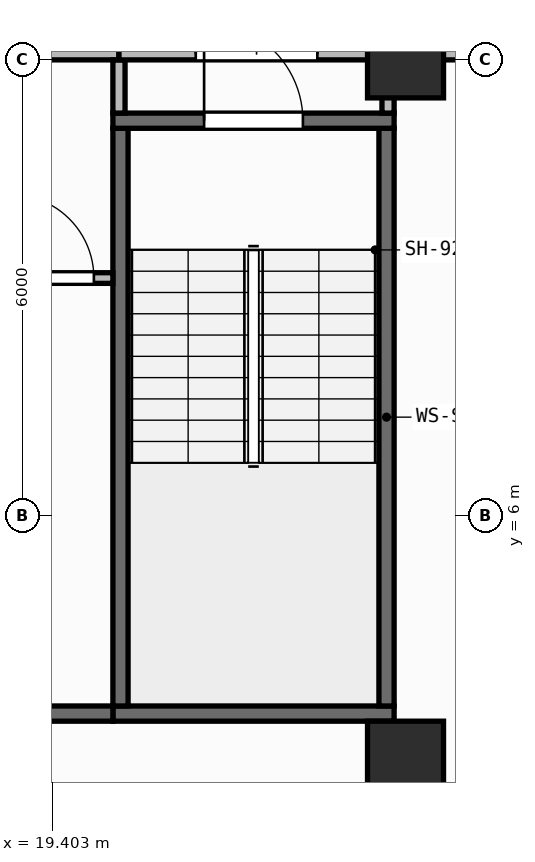
"""IFC4 building model, lengths in metres.
Left out: names, types, materials, properties, quantities, classifications, styles, units other than length and angle.
Written with IfcOpenShell. Run it as: python <this file> out.ifc"""

import sys

from ifc_helpers import new_model, si_unit, direction, frame, frame_2d, origin, origin_2d, place, context, subcontext, project, spatial, rectangle, extrude, element, fill, save


model = new_model("IFC4")
c1 = context("Model", 3, precision=1e-05, world=origin(), true_north=direction((0.0, 1.0)))
c2 = subcontext(c1, "Body", "Model", "MODEL_VIEW")
j1 = project(units=[si_unit("LENGTHUNIT", "METRE"), si_unit("PLANEANGLEUNIT", "RADIAN")], contexts=[c1])
p1 = place(None, origin())
s1 = spatial("IfcSite", under=j1, at=p1, CompositionType="ELEMENT")
p2 = place(p1, origin())
s2 = spatial("IfcBuilding", under=s1, at=p2, CompositionType="ELEMENT")
p3 = place(p2, frame((0.0, 0.0, 203.95)))
s3 = spatial("IfcBuildingStorey", under=s2, at=p3, CompositionType="ELEMENT", Elevation=203.95)
for number, where, z_axis, x_axis in (
    (1, (24.05, 2.8, 0.0), (0.0, 0.0, 1.0), (1.0, 0.0, 0.0)),
    (2, (24.05, 12.0, 0.0), (0.0, 0.0, 1.0), (1.0, 0.0, 0.0)),
):
    element("IfcColumn", number, at=place(p3, frame(where, z_axis=z_axis, x_axis=x_axis)), inside=s3, PredefinedType="COLUMN", context=c2, shape_type="SweptSolid", body=[
        extrude(rectangle(XDim=1.0, YDim=1.0, at=origin_2d()), origin(), (0.0, 0.0, 1.0), 3.95),
    ])
p4 = place(p3, frame((2.66, 0.174, 0.0), z_axis=(0.0, 0.0, 1.0), x_axis=(0.996634028439, 0.081979347142, 0.0)))
e3 = element("IfcWall", 3, at=p4, inside=s3, PredefinedType="STANDARD", context=c2, shape_type="SweptSolid", body=[
    extrude(rectangle(XDim=46.035, YDim=0.26, at=frame_2d((23.018, 0.0))), origin(), (0.0, 0.0, 1.0), 3.71),
])
p5 = place(p4, frame((21.817, 0.0, 0.9)))
e4 = element("IfcOpeningElement", 4, at=p5, cuts=e3, PredefinedType="OPENING", context=c2, shape_type="SweptSolid", body=[
    extrude(rectangle(XDim=2.4, YDim=1.65, at=frame_2d((1.2, 0.825))), frame((0.0, 0.14, 0.0), z_axis=(0.0, -1.0, 0.0), x_axis=(1.0, 0.0, 0.0)), (0.0, 0.0, 1.0), 0.28),
])
p6 = place(p3, frame((20.2, 3.4, 0.0), z_axis=(0.0, 0.0, 1.0), x_axis=(1.0, 0.0, 0.0)))
e5 = element("IfcWall", 5, at=p6, inside=s3, PredefinedType="SHEAR", context=c2, shape_type="SweptSolid", body=[
    extrude(rectangle(XDim=3.7, YDim=0.2, at=frame_2d((1.85, 0.0))), origin(), (0.0, 0.0, 1.0), 3.71),
])
for number, where, z_axis, x_axis in (
    (6, (20.3, 3.5, 0.0), (0.0, 0.0, 1.0), (0.0, 1.0, 0.0)),
    (7, (23.8, 3.5, 0.0), (0.0, 0.0, 1.0), (0.0, 1.0, 0.0)),
):
    element("IfcWall", number, at=place(p3, frame(where, z_axis=z_axis, x_axis=x_axis)), inside=s3, PredefinedType="SHEAR", context=c2, shape_type="SweptSolid", body=[
        extrude(rectangle(XDim=7.6, YDim=0.2, at=frame_2d((3.8, 0.0))), origin(), (0.0, 0.0, 1.0), 3.71),
    ])
p7 = place(p3, frame((20.2, 11.2, 0.0), z_axis=(0.0, 0.0, 1.0), x_axis=(1.0, 0.0, 0.0)))
e8 = element("IfcWall", 8, at=p7, inside=s3, PredefinedType="SHEAR", context=c2, shape_type="SweptSolid", body=[
    extrude(rectangle(XDim=3.7, YDim=0.2, at=frame_2d((1.85, 0.0))), origin(), (0.0, 0.0, 1.0), 3.71),
])
p8 = place(p7, frame((1.2, 0.0, 0.0)))
e9 = element("IfcOpeningElement", 9, at=p8, cuts=e8, PredefinedType="OPENING", context=c2, shape_type="SweptSolid", body=[
    extrude(rectangle(XDim=1.3, YDim=2.15, at=frame_2d((0.65, 1.075))), frame((0.0, 0.11, 0.0), z_axis=(0.0, -1.0, 0.0), x_axis=(1.0, 0.0, 0.0)), (0.0, 0.0, 1.0), 0.22),
])
p9 = place(p3, frame((6.5, 3.4, 0.0), z_axis=(0.0, 0.0, 1.0), x_axis=(1.0, 0.0, 0.0)))
e10 = element("IfcWall", 10, at=p9, inside=s3, PredefinedType="SHEAR", context=c2, shape_type="SweptSolid", body=[
    extrude(rectangle(XDim=13.7, YDim=0.2, at=frame_2d((6.85, 0.0))), origin(), (0.0, 0.0, 1.0), 3.71),
])
p10 = place(p3, frame((18.61, 9.13, 0.0), z_axis=(0.0, 0.0, 1.0), x_axis=(1.0, 0.0, 0.0)))
e11 = element("IfcWall", 11, at=p10, inside=s3, PredefinedType="PARTITIONING", context=c2, shape_type="SweptSolid", body=[
    extrude(rectangle(XDim=1.59, YDim=0.14, at=frame_2d((0.795, 0.0))), origin(), (0.0, 0.0, 1.0), 3.71),
])
p11 = place(p10, frame((0.24, 0.0, 0.0)))
e12 = element("IfcOpeningElement", 12, at=p11, cuts=e11, PredefinedType="OPENING", context=c2, shape_type="SweptSolid", body=[
    extrude(rectangle(XDim=1.1, YDim=2.1, at=frame_2d((0.55, 1.05))), frame((0.0, 0.08, 0.0), z_axis=(0.0, -1.0, 0.0), x_axis=(1.0, 0.0, 0.0)), (0.0, 0.0, 1.0), 0.16),
])
p12 = place(p3, frame((12.58, 12.08, 0.0), z_axis=(0.0, 0.0, 1.0), x_axis=(1.0, 0.0, 0.0)))
e13 = element("IfcWall", 13, at=p12, inside=s3, PredefinedType="PARTITIONING", context=c2, shape_type="SweptSolid", body=[
    extrude(rectangle(XDim=7.7, YDim=0.16, at=frame_2d((3.85, 0.0))), origin(), (0.0, 0.0, 1.0), 3.152),
])
p13 = place(p12, frame((3.05, 0.0, 0.0)))
e14 = element("IfcOpeningElement", 14, at=p13, cuts=e13, PredefinedType="OPENING", context=c2, shape_type="SweptSolid", body=[
    extrude(rectangle(XDim=1.6, YDim=2.05, at=frame_2d((0.8, 1.025))), frame((0.0, 0.09, 0.0), z_axis=(0.0, -1.0, 0.0), x_axis=(1.0, 0.0, 0.0)), (0.0, 0.0, 1.0), 0.18),
])
p14 = place(p3, frame((20.28, 11.3, 0.0), z_axis=(0.0, 0.0, 1.0), x_axis=(0.0, 1.0, 0.0)))
e15 = element("IfcWall", 15, at=p14, inside=s3, PredefinedType="PARTITIONING", context=c2, shape_type="SweptSolid", body=[
    extrude(rectangle(XDim=0.7, YDim=0.16, at=frame_2d((0.35, 0.0))), origin(), (0.0, 0.0, 1.0), 3.71),
])
p15 = place(p3, frame((20.28, 12.08, 0.0), z_axis=(0.0, 0.0, 1.0), x_axis=(1.0, 0.0, 0.0)))
e16 = element("IfcWall", 16, at=p15, inside=s3, PredefinedType="PARTITIONING", context=c2, shape_type="SweptSolid", body=[
    extrude(rectangle(XDim=3.62, YDim=0.16, at=frame_2d((1.81, 0.0))), origin(), (0.0, 0.0, 1.0), 3.152),
])
p16 = place(p15, frame((1.01, 0.0, 0.0)))
e17 = element("IfcOpeningElement", 17, at=p16, cuts=e16, PredefinedType="OPENING", context=c2, shape_type="SweptSolid", body=[
    extrude(rectangle(XDim=1.6, YDim=2.05, at=frame_2d((0.8, 1.025))), frame((0.0, 0.09, 0.0), z_axis=(0.0, -1.0, 0.0), x_axis=(1.0, 0.0, 0.0)), (0.0, 0.0, 1.0), 0.18),
])
p17 = place(p3, frame((23.82, 11.3, 0.0), z_axis=(0.0, 0.0, 1.0), x_axis=(0.0, 1.0, 0.0)))
e18 = element("IfcWall", 18, at=p17, inside=s3, PredefinedType="PARTITIONING", context=c2, shape_type="SweptSolid", body=[
    extrude(rectangle(XDim=0.7, YDim=0.16, at=frame_2d((0.35, 0.0))), origin(), (0.0, 0.0, 1.0), 3.71),
])
p18 = place(p3, frame((24.02, 12.08, 0.0), z_axis=(0.0, 0.0, 1.0), x_axis=(1.0, 0.0, 0.0)))
e19 = element("IfcWall", 19, at=p18, inside=s3, PredefinedType="PARTITIONING", context=c2, shape_type="SweptSolid", body=[
    extrude(rectangle(XDim=1.219, YDim=0.16, at=frame_2d((0.609, 0.0))), origin(), (0.0, 0.0, 1.0), 3.152),
])
p19 = place(p8, origin())
e20 = element("IfcDoor", 20, at=p19, inside=s3, OperationType="SINGLE_SWING_LEFT", PredefinedType="DOOR", context=c2, shape_type="SweptSolid", body=[
    extrude(rectangle(XDim=1.3, YDim=2.15, at=frame_2d((0.65, 1.075))), frame((0.0, 0.025, 0.0), z_axis=(0.0, -1.0, 0.0), x_axis=(1.0, 0.0, 0.0)), (0.0, 0.0, 1.0), 0.05),
])
fill(e9, e20)
p20 = place(p11, origin())
e21 = element("IfcDoor", 21, at=p20, inside=s3, OperationType="SINGLE_SWING_LEFT", PredefinedType="DOOR", context=c2, shape_type="SweptSolid", body=[
    extrude(rectangle(XDim=1.1, YDim=2.1, at=frame_2d((0.55, 1.05))), frame((0.0, 0.025, 0.0), z_axis=(0.0, -1.0, 0.0), x_axis=(1.0, 0.0, 0.0)), (0.0, 0.0, 1.0), 0.05),
])
fill(e12, e21)
p21 = place(p16, origin())
e22 = element("IfcDoor", 22, at=p21, inside=s3, OperationType="DOUBLE_DOOR_SINGLE_SWING", PredefinedType="DOOR", context=c2, shape_type="SweptSolid", body=[
    extrude(rectangle(XDim=1.6, YDim=2.05, at=frame_2d((0.8, 1.025))), frame((0.0, 0.025, 0.0), z_axis=(0.0, -1.0, 0.0), x_axis=(1.0, 0.0, 0.0)), (0.0, 0.0, 1.0), 0.05),
])
fill(e17, e22)
save(model, sys.argv[1])
